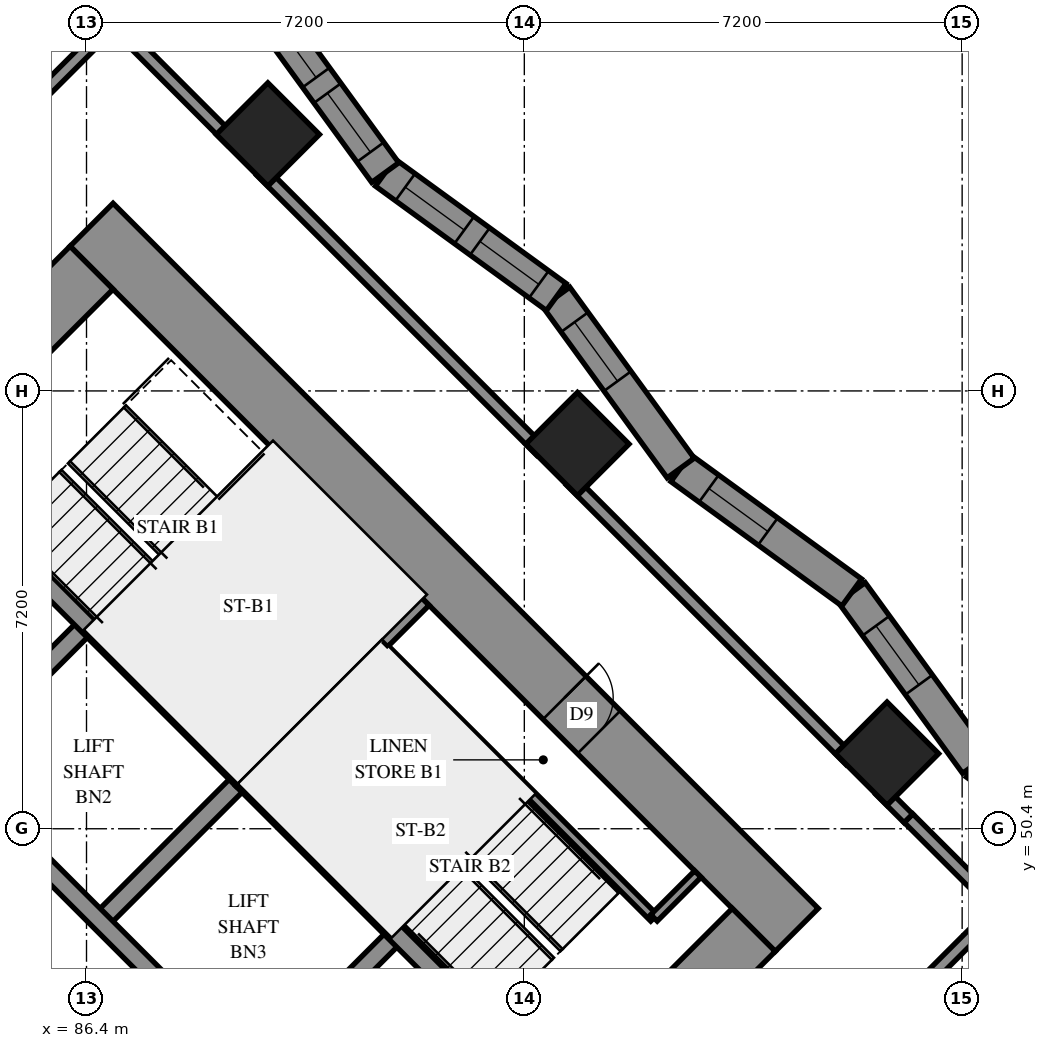
"""IFC4 building model, lengths in metres.
Left out: names, types, materials, properties, quantities, classifications, styles, units other than length and angle.
Written with IfcOpenShell. Run it as: python <this file> out.ifc"""

import sys

from ifc_helpers import new_model, si_unit, direction, frame, frame_2d, origin, origin_2d, place, context, subcontext, project, spatial, polyline, rectangle, outline, extrude, element, fill, save


model = new_model("IFC4")
c1 = context("Model", 3, precision=1e-05, world=origin(), true_north=direction((0.0, 1.0)))
c2 = subcontext(c1, "Body", "Model", "MODEL_VIEW")
j1 = project(units=[si_unit("LENGTHUNIT", "METRE"), si_unit("PLANEANGLEUNIT", "RADIAN")], contexts=[c1])
p1 = place(None, origin())
s1 = spatial("IfcSite", under=j1, at=p1, CompositionType="ELEMENT")
p2 = place(p1, origin())
s2 = spatial("IfcBuilding", under=s1, at=p2, CompositionType="ELEMENT")
p3 = place(p2, frame((0.0, 0.0, 54.2)))
s3 = spatial("IfcBuildingStorey", under=s2, at=p3, CompositionType="ELEMENT", Elevation=54.2)
for number, where, z_axis, x_axis in (
    (1, (89.382, 61.818, 0.0), (0.0, 0.0, 1.0), (0.707, -0.707, 0.0)),
    (2, (94.474, 56.727, 0.0), (0.0, 0.0, 1.0), (0.707, -0.707, 0.0)),
    (3, (99.565, 51.635, 0.0), (0.0, 0.0, 1.0), (0.707, -0.707, 0.0)),
):
    element("IfcColumn", number, at=place(p3, frame(where, z_axis=z_axis, x_axis=x_axis)), inside=s3, PredefinedType="COLUMN", context=c2, shape_type="SweptSolid", body=[
        extrude(rectangle(XDim=1.2, YDim=1.2, at=origin_2d()), origin(), (0.0, 0.0, 1.0), 3.1),
    ])
p4 = place(p3, frame((75.594, 49.443, -0.3), z_axis=(0.0, 0.0, 1.0), x_axis=(0.7071037324, -0.70710983, 0.0)))
e4 = element("IfcWall", 4, at=p4, inside=s3, PredefinedType="SHEAR", context=c2, shape_type="SweptSolid", body=[
    extrude(rectangle(XDim=16.4, YDim=1.0, at=frame_2d((8.2, 0.0))), origin(), (0.0, 0.0, 1.0), 2.7),
])
p5 = place(p3, frame((86.483, 60.333, -0.3), z_axis=(0.0, 0.0, 1.0), x_axis=(0.70710983, -0.7071037324, 0.0)))
e5 = element("IfcWall", 5, at=p5, inside=s3, PredefinedType="SHEAR", context=c2, shape_type="SweptSolid", body=[
    extrude(rectangle(XDim=16.4, YDim=1.0, at=frame_2d((8.2, 0.0))), origin(), (0.0, 0.0, 1.0), 2.7),
])
p6 = place(p5, frame((11.0, 0.0, 0.3)))
e6 = element("IfcOpeningElement", 6, at=p6, cuts=e5, PredefinedType="OPENING", context=c2, shape_type="SweptSolid", body=[
    extrude(rectangle(XDim=0.8, YDim=2.1, at=frame_2d((0.4, 1.05))), frame((0.0, 0.51, 0.0), z_axis=(0.0, -1.0, 0.0), x_axis=(1.0, 0.0, 0.0)), (0.0, 0.0, 1.0), 1.02),
])
p7 = place(p3, frame((76.301, 49.443, -0.3), z_axis=(0.0, 0.0, 1.0), x_axis=(0.7071067812, 0.7071067812, 0.0)))
e7 = element("IfcWall", 7, at=p7, inside=s3, PredefinedType="SHEAR", context=c2, shape_type="SweptSolid", body=[
    extrude(rectangle(XDim=14.4, YDim=1.0, at=frame_2d((7.2, 0.0))), origin(), (0.0, 0.0, 1.0), 2.7),
])
p8 = place(p7, frame((4.55, 0.0, 0.3)))
e8 = element("IfcOpeningElement", 8, at=p8, cuts=e7, PredefinedType="OPENING", context=c2, shape_type="SweptSolid", body=[
    extrude(rectangle(XDim=1.1, YDim=2.1, at=frame_2d((0.55, 1.05))), frame((0.0, 0.51, 0.0), z_axis=(0.0, -1.0, 0.0), x_axis=(1.0, 0.0, 0.0)), (0.0, 0.0, 1.0), 1.02),
])
p9 = place(p7, frame((11.35, 0.0, 0.3)))
e9 = element("IfcOpeningElement", 9, at=p9, cuts=e7, PredefinedType="OPENING", context=c2, shape_type="SweptSolid", body=[
    extrude(rectangle(XDim=1.1, YDim=2.1, at=frame_2d((0.55, 1.05))), frame((0.0, 0.51, 0.0), z_axis=(0.0, -1.0, 0.0), x_axis=(1.0, 0.0, 0.0)), (0.0, 0.0, 1.0), 1.02),
])
p10 = place(p3, frame((87.19, 38.554, -0.3), z_axis=(0.0, 0.0, 1.0), x_axis=(0.707103309, 0.7071102534, 0.0)))
e10 = element("IfcWall", 10, at=p10, inside=s3, PredefinedType="SHEAR", context=c2, shape_type="SweptSolid", body=[
    extrude(rectangle(XDim=14.4, YDim=1.0, at=frame_2d((7.2, 0.0))), origin(), (0.0, 0.0, 1.0), 2.7),
])
p11 = place(p10, frame((4.55, 0.0, 0.3)))
e11 = element("IfcOpeningElement", 11, at=p11, cuts=e10, PredefinedType="OPENING", context=c2, shape_type="SweptSolid", body=[
    extrude(rectangle(XDim=1.1, YDim=2.1, at=frame_2d((0.55, 1.05))), frame((0.0, 0.51, 0.0), z_axis=(0.0, -1.0, 0.0), x_axis=(1.0, 0.0, 0.0)), (0.0, 0.0, 1.0), 1.02),
])
p12 = place(p10, frame((11.35, 0.0, 0.3)))
e12 = element("IfcOpeningElement", 12, at=p12, cuts=e10, PredefinedType="OPENING", context=c2, shape_type="SweptSolid", body=[
    extrude(rectangle(XDim=1.1, YDim=2.1, at=frame_2d((0.55, 1.05))), frame((0.0, 0.51, 0.0), z_axis=(0.0, -1.0, 0.0), x_axis=(1.0, 0.0, 0.0)), (0.0, 0.0, 1.0), 1.02),
])
p13 = place(p3, frame((84.079, 51.423, 0.0), z_axis=(0.0, 0.0, 1.0), x_axis=(0.7071219326, 0.7070916295, 0.0)))
e13 = element("IfcWall", 13, at=p13, inside=s3, PredefinedType="SOLIDWALL", context=c2, shape_type="SweptSolid", body=[
    extrude(rectangle(XDim=3.3, YDim=0.3, at=frame_2d((1.65, 0.0))), origin(), (0.0, 0.0, 1.0), 3.1),
])
for number, where, z_axis, x_axis in (
    (14, (86.625, 48.878, 0.0), (0.0, 0.0, 1.0), (0.707, 0.707, 0.0)),
    (15, (89.17, 46.332, 0.0), (0.0, 0.0, 1.0), (0.707, 0.707, 0.0)),
):
    element("IfcWall", number, at=place(p3, frame(where, z_axis=z_axis, x_axis=x_axis)), inside=s3, PredefinedType="SOLIDWALL", context=c2, shape_type="SweptSolid", body=[
        extrude(rectangle(XDim=3.3, YDim=0.3, at=frame_2d((1.65, 0.0))), origin(), (0.0, 0.0, 1.0), 3.1),
    ])
p14 = place(p3, frame((78.988, 51.423, 0.0), z_axis=(0.0, 0.0, 1.0), x_axis=(0.7071067812, -0.7071067812, 0.0)))
e16 = element("IfcWall", 16, at=p14, inside=s3, PredefinedType="SOLIDWALL", context=c2, shape_type="SweptSolid", body=[
    extrude(rectangle(XDim=14.4, YDim=0.3, at=frame_2d((7.2, 0.0))), origin(), (0.0, 0.0, 1.0), 3.1),
])
p15 = place(p14, frame((1.25, 0.0, 0.0)))
e17 = element("IfcOpeningElement", 17, at=p15, cuts=e16, PredefinedType="OPENING", context=c2, shape_type="SweptSolid", body=[
    extrude(rectangle(XDim=1.1, YDim=2.1, at=frame_2d((0.55, 1.05))), frame((0.0, 0.16, 0.0), z_axis=(0.0, -1.0, 0.0), x_axis=(1.0, 0.0, 0.0)), (0.0, 0.0, 1.0), 0.32),
])
p16 = place(p14, frame((4.85, 0.0, 0.0)))
e18 = element("IfcOpeningElement", 18, at=p16, cuts=e16, PredefinedType="OPENING", context=c2, shape_type="SweptSolid", body=[
    extrude(rectangle(XDim=1.1, YDim=2.1, at=frame_2d((0.55, 1.05))), frame((0.0, 0.16, 0.0), z_axis=(0.0, -1.0, 0.0), x_axis=(1.0, 0.0, 0.0)), (0.0, 0.0, 1.0), 0.32),
])
p17 = place(p14, frame((8.45, 0.0, 0.0)))
e19 = element("IfcOpeningElement", 19, at=p17, cuts=e16, PredefinedType="OPENING", context=c2, shape_type="SweptSolid", body=[
    extrude(rectangle(XDim=1.1, YDim=2.1, at=frame_2d((0.55, 1.05))), frame((0.0, 0.16, 0.0), z_axis=(0.0, -1.0, 0.0), x_axis=(1.0, 0.0, 0.0)), (0.0, 0.0, 1.0), 0.32),
])
p18 = place(p14, frame((12.05, 0.0, 0.0)))
e20 = element("IfcOpeningElement", 20, at=p18, cuts=e16, PredefinedType="OPENING", context=c2, shape_type="SweptSolid", body=[
    extrude(rectangle(XDim=1.1, YDim=2.1, at=frame_2d((0.55, 1.05))), frame((0.0, 0.16, 0.0), z_axis=(0.0, -1.0, 0.0), x_axis=(1.0, 0.0, 0.0)), (0.0, 0.0, 1.0), 0.32),
])
p19 = place(p3, frame((81.534, 53.969, 0.0), z_axis=(0.0, 0.0, 1.0), x_axis=(0.707103309, -0.7071102534, 0.0)))
e21 = element("IfcWall", 21, at=p19, inside=s3, PredefinedType="SOLIDWALL", context=c2, shape_type="SweptSolid", body=[
    extrude(rectangle(XDim=14.4, YDim=0.3, at=frame_2d((7.2, 0.0))), origin(), (0.0, 0.0, 1.0), 3.1),
])
p20 = place(p19, frame((12.05, 0.0, 0.0)))
e22 = element("IfcOpeningElement", 22, at=p20, cuts=e21, PredefinedType="OPENING", context=c2, shape_type="SweptSolid", body=[
    extrude(rectangle(XDim=1.1, YDim=2.1, at=frame_2d((0.55, 1.05))), frame((0.0, 0.16, 0.0), z_axis=(0.0, -1.0, 0.0), x_axis=(1.0, 0.0, 0.0)), (0.0, 0.0, 1.0), 0.32),
])
for number, where, z_axis, x_axis in (
    (23, (83.867, 56.302, 0.0), (0.0, 0.0, 1.0), (0.707, -0.707, 0.0)),
    (24, (88.958, 51.211, 0.0), (0.0, 0.0, 1.0), (0.707, -0.707, 0.0)),
):
    element("IfcWall", number, at=place(p3, frame(where, z_axis=z_axis, x_axis=x_axis)), inside=s3, PredefinedType="SOLIDWALL", context=c2, shape_type="SweptSolid", body=[
        extrude(rectangle(XDim=7.2, YDim=0.3, at=frame_2d((3.6, 0.0))), origin(), (0.0, 0.0, 1.0), 3.1),
    ])
p21 = place(p3, frame((88.958, 51.211, 0.0), z_axis=(0.0, 0.0, 1.0), x_axis=(0.7071067812, 0.7071067812, 0.0)))
e25 = element("IfcWall", 25, at=p21, inside=s3, PredefinedType="SOLIDWALL", context=c2, shape_type="SweptSolid", body=[
    extrude(rectangle(XDim=4.2, YDim=0.3, at=frame_2d((2.1, 0.0))), origin(), (0.0, 0.0, 1.0), 3.1),
])
p22 = place(p3, frame((103.843, 49.427, 0.0), z_axis=(0.0, 0.0, 1.0), x_axis=(-0.8086676991, 0.5882657159, 0.0)))
e26 = element("IfcWall", 26, at=p22, inside=s3, PredefinedType="SOLIDWALL", context=c2, shape_type="SweptSolid", body=[
    extrude(outline(polyline([(-0.043, -0.275), (3.435, -0.275), (3.522, 0.275), (0.043, 0.275), (-0.043, -0.275)])), origin(), (0.0, 0.0, 1.0), 3.1),
])
p23 = place(p22, frame((1.538, 0.0, 0.5)))
e27 = element("IfcOpeningElement", 27, at=p23, cuts=e26, PredefinedType="OPENING", context=c2, shape_type="SweptSolid", body=[
    extrude(rectangle(XDim=1.2, YDim=2.45, at=frame_2d((0.6, 1.225))), frame((0.0, 0.285, 0.0), z_axis=(0.0, -1.0, 0.0), x_axis=(1.0, 0.0, 0.0)), (0.0, 0.0, 1.0), 0.57),
])
p24 = place(p3, frame((101.03, 51.473, 0.0), z_axis=(0.0, 0.0, 1.0), x_axis=(-0.5882793931, 0.8086577494, 0.0)))
e28 = element("IfcWall", 28, at=p24, inside=s3, PredefinedType="SOLIDWALL", context=c2, shape_type="SweptSolid", body=[
    extrude(outline(polyline([(0.043, -0.275), (3.522, -0.275), (3.435, 0.275), (-0.043, 0.275), (0.043, -0.275)])), origin(), (0.0, 0.0, 1.0), 3.1),
])
p25 = place(p24, frame((1.6, 0.0, 0.5)))
e29 = element("IfcOpeningElement", 29, at=p25, cuts=e28, PredefinedType="OPENING", context=c2, shape_type="SweptSolid", body=[
    extrude(rectangle(XDim=1.2, YDim=2.45, at=frame_2d((0.6, 1.225))), frame((0.0, 0.285, 0.0), z_axis=(0.0, -1.0, 0.0), x_axis=(1.0, 0.0, 0.0)), (0.0, 0.0, 1.0), 0.57),
])
p26 = place(p3, frame((98.984, 54.286, 0.0), z_axis=(0.0, 0.0, 1.0), x_axis=(-0.8086577494, 0.5882793931, 0.0)))
e30 = element("IfcWall", 30, at=p26, inside=s3, PredefinedType="SOLIDWALL", context=c2, shape_type="SweptSolid", body=[
    extrude(outline(polyline([(-0.043, -0.275), (3.435, -0.275), (3.522, 0.275), (0.043, 0.275), (-0.043, -0.275)])), origin(), (0.0, 0.0, 1.0), 3.1),
])
p27 = place(p26, frame((1.705, 0.0, 0.5)))
e31 = element("IfcOpeningElement", 31, at=p27, cuts=e30, PredefinedType="OPENING", context=c2, shape_type="SweptSolid", body=[
    extrude(rectangle(XDim=1.2, YDim=2.45, at=frame_2d((0.6, 1.225))), frame((0.0, 0.285, 0.0), z_axis=(0.0, -1.0, 0.0), x_axis=(1.0, 0.0, 0.0)), (0.0, 0.0, 1.0), 0.57),
])
p28 = place(p3, frame((96.171, 56.332, 0.0), z_axis=(0.0, 0.0, 1.0), x_axis=(-0.5882793931, 0.8086577494, 0.0)))
e32 = element("IfcWall", 32, at=p28, inside=s3, PredefinedType="SOLIDWALL", context=c2, shape_type="SweptSolid", body=[
    extrude(outline(polyline([(0.043, -0.275), (3.522, -0.275), (3.435, 0.275), (-0.043, 0.275), (0.043, -0.275)])), origin(), (0.0, 0.0, 1.0), 3.1),
])
p29 = place(p28, frame((1.766, 0.0, 0.5)))
e33 = element("IfcOpeningElement", 33, at=p29, cuts=e32, PredefinedType="OPENING", context=c2, shape_type="SweptSolid", body=[
    extrude(rectangle(XDim=1.2, YDim=2.45, at=frame_2d((0.6, 1.225))), frame((0.0, 0.285, 0.0), z_axis=(0.0, -1.0, 0.0), x_axis=(1.0, 0.0, 0.0)), (0.0, 0.0, 1.0), 0.57),
])
p30 = place(p3, frame((94.125, 59.145, 0.0), z_axis=(0.0, 0.0, 1.0), x_axis=(-0.808644072, 0.5882981939, 0.0)))
e34 = element("IfcWall", 34, at=p30, inside=s3, PredefinedType="SOLIDWALL", context=c2, shape_type="SweptSolid", body=[
    extrude(outline(polyline([(-0.043, -0.275), (3.435, -0.275), (3.522, 0.275), (0.043, 0.275), (-0.043, -0.275)])), origin(), (0.0, 0.0, 1.0), 3.1),
])
p31 = place(p30, frame((0.354, 0.0, 0.5)))
e35 = element("IfcOpeningElement", 35, at=p31, cuts=e34, PredefinedType="OPENING", context=c2, shape_type="SweptSolid", body=[
    extrude(rectangle(XDim=1.2, YDim=2.45, at=frame_2d((0.6, 1.225))), frame((0.0, 0.285, 0.0), z_axis=(0.0, -1.0, 0.0), x_axis=(1.0, 0.0, 0.0)), (0.0, 0.0, 1.0), 0.57),
])
p32 = place(p30, frame((1.871, 0.0, 0.5)))
e36 = element("IfcOpeningElement", 36, at=p32, cuts=e34, PredefinedType="OPENING", context=c2, shape_type="SweptSolid", body=[
    extrude(rectangle(XDim=1.2, YDim=2.45, at=frame_2d((0.6, 1.225))), frame((0.0, 0.285, 0.0), z_axis=(0.0, -1.0, 0.0), x_axis=(1.0, 0.0, 0.0)), (0.0, 0.0, 1.0), 0.57),
])
p33 = place(p3, frame((91.312, 61.191, 0.0), z_axis=(0.0, 0.0, 1.0), x_axis=(-0.5882793931, 0.8086577494, 0.0)))
e37 = element("IfcWall", 37, at=p33, inside=s3, PredefinedType="SOLIDWALL", context=c2, shape_type="SweptSolid", body=[
    extrude(outline(polyline([(0.043, -0.275), (3.522, -0.275), (3.435, 0.275), (-0.043, 0.275), (0.043, -0.275)])), origin(), (0.0, 0.0, 1.0), 3.1),
])
p34 = place(p33, frame((0.415, 0.0, 0.5)))
e38 = element("IfcOpeningElement", 38, at=p34, cuts=e37, PredefinedType="OPENING", context=c2, shape_type="SweptSolid", body=[
    extrude(rectangle(XDim=1.2, YDim=2.45, at=frame_2d((0.6, 1.225))), frame((0.0, 0.285, 0.0), z_axis=(0.0, -1.0, 0.0), x_axis=(1.0, 0.0, 0.0)), (0.0, 0.0, 1.0), 0.57),
])
p35 = place(p33, frame((1.933, 0.0, 0.5)))
e39 = element("IfcOpeningElement", 39, at=p35, cuts=e37, PredefinedType="OPENING", context=c2, shape_type="SweptSolid", body=[
    extrude(rectangle(XDim=1.2, YDim=2.45, at=frame_2d((0.6, 1.225))), frame((0.0, 0.285, 0.0), z_axis=(0.0, -1.0, 0.0), x_axis=(1.0, 0.0, 0.0)), (0.0, 0.0, 1.0), 0.57),
])
p36 = place(p3, frame((91.313, 53.354, 0.0), z_axis=(0.0, 0.0, 1.0), x_axis=(0.7071147811, -0.7070987812, 0.0)))
e40 = element("IfcWall", 40, at=p36, inside=s3, PredefinedType="PARTITIONING", context=c2, shape_type="SweptSolid", body=[
    extrude(rectangle(XDim=6.25, YDim=0.15, at=frame_2d((3.125, 0.0))), origin(), (0.0, 0.0, 1.0), 3.1),
])
p37 = place(p3, frame((95.732, 48.934, 0.0), z_axis=(0.0, 0.0, 1.0), x_axis=(0.7071067812, 0.7071067812, 0.0)))
e41 = element("IfcWall", 41, at=p37, inside=s3, PredefinedType="PARTITIONING", context=c2, shape_type="SweptSolid", body=[
    extrude(rectangle(XDim=1.02, YDim=0.15, at=frame_2d((0.51, 0.0))), origin(), (0.0, 0.0, 1.0), 3.1),
])
p38 = place(p3, frame((95.109, 42.091, 0.0), z_axis=(0.0, 0.0, 1.0), x_axis=(0.7071113562, 0.7071022062, 0.0)))
e42 = element("IfcWall", 42, at=p38, inside=s3, PredefinedType="PARTITIONING", context=c2, shape_type="SweptSolid", body=[
    extrude(rectangle(XDim=10.929, YDim=0.2, at=frame_2d((5.465, 0.0))), origin(), (0.0, 0.0, 1.0), 3.1),
])
p39 = place(p3, frame((94.757, 42.445, 0.0), z_axis=(0.0, 0.0, 1.0), x_axis=(0.7071067812, 0.7071067812, 0.0)))
e43 = element("IfcWall", 43, at=p39, inside=s3, PredefinedType="PARTITIONING", context=c2, shape_type="SweptSolid", body=[
    extrude(rectangle(XDim=9.399, YDim=0.2, at=frame_2d((4.699, 0.0))), origin(), (0.0, 0.0, 1.0), 3.1),
])
p40 = place(p3, frame((81.052, 57.873, 0.0), z_axis=(0.0, 0.0, 1.0), x_axis=(0.7071067812, 0.7071067812, 0.0)))
e44 = element("IfcWall", 44, at=p40, inside=s3, PredefinedType="PARTITIONING", context=c2, shape_type="SweptSolid", body=[
    extrude(rectangle(XDim=8.18, YDim=0.2, at=frame_2d((4.09, 0.0))), origin(), (0.0, 0.0, 1.0), 3.1),
])
p41 = place(p40, frame((0.823, 0.0, 0.0)))
e45 = element("IfcOpeningElement", 45, at=p41, cuts=e44, PredefinedType="OPENING", context=c2, shape_type="SweptSolid", body=[
    extrude(rectangle(XDim=1.0, YDim=2.1, at=frame_2d((0.5, 1.05))), frame((0.0, 0.11, 0.0), z_axis=(0.0, -1.0, 0.0), x_axis=(1.0, 0.0, 0.0)), (0.0, 0.0, 1.0), 0.22),
])
p42 = place(p3, frame((89.271, 61.215, 0.0), z_axis=(0.0, 0.0, 1.0), x_axis=(0.7071067812, -0.7071067812, 0.0)))
e46 = element("IfcWall", 46, at=p42, inside=s3, PredefinedType="PARTITIONING", context=c2, shape_type="SweptSolid", body=[
    extrude(rectangle(XDim=6.505, YDim=0.2, at=frame_2d((3.253, 0.0))), origin(), (0.0, 0.0, 1.0), 3.1),
])
p43 = place(p3, frame((94.363, 56.123, 0.0), z_axis=(0.0, 0.0, 1.0), x_axis=(0.7071067812, -0.7071067812, 0.0)))
e47 = element("IfcWall", 47, at=p43, inside=s3, PredefinedType="PARTITIONING", context=c2, shape_type="SweptSolid", body=[
    extrude(rectangle(XDim=6.503, YDim=0.2, at=frame_2d((3.251, 0.0))), origin(), (0.0, 0.0, 1.0), 3.1),
])
p44 = place(p3, frame((86.841, 63.659, 0.0), z_axis=(0.0, 0.0, 1.0), x_axis=(0.7067795096, -0.7074339014, 0.0)))
e48 = element("IfcWall", 48, at=p44, inside=s3, PredefinedType="PARTITIONING", context=c2, shape_type="SweptSolid", body=[
    extrude(rectangle(XDim=2.751, YDim=0.2, at=frame_2d((1.375, 0.0))), origin(), (0.0, 0.0, 1.0), 3.1),
])
p45 = place(p3, frame((99.918, 50.574, 0.0), z_axis=(0.0, 0.0, 1.0), x_axis=(0.7075827869, -0.7066304548, 0.0)))
e49 = element("IfcWall", 49, at=p45, inside=s3, PredefinedType="PARTITIONING", context=c2, shape_type="SweptSolid", body=[
    extrude(rectangle(XDim=2.1, YDim=0.2, at=frame_2d((1.05, 0.0))), origin(), (0.0, 0.0, 1.0), 3.1),
])
p46 = place(p3, frame((99.453, 51.033, 0.0), z_axis=(0.0, 0.0, 1.0), x_axis=(0.7071067812, -0.7071067812, 0.0)))
e50 = element("IfcWall", 50, at=p46, inside=s3, PredefinedType="PARTITIONING", context=c2, shape_type="SweptSolid", body=[
    extrude(rectangle(XDim=0.653, YDim=0.2, at=frame_2d((0.327, 0.0))), origin(), (0.0, 0.0, 1.0), 3.1),
])
p47 = place(p25, origin())
e51 = element("IfcWindow", 51, at=p47, inside=s3, PartitioningType="SINGLE_PANEL", PredefinedType="WINDOW", context=c2, shape_type="SweptSolid", body=[
    extrude(rectangle(XDim=1.2, YDim=2.45, at=frame_2d((0.6, 1.225))), frame((0.0, 0.155, 0.0), z_axis=(0.0, -1.0, 0.0), x_axis=(1.0, 0.0, 0.0)), (0.0, 0.0, 1.0), 0.06),
])
fill(e29, e51)
p48 = place(p27, origin())
e52 = element("IfcWindow", 52, at=p48, inside=s3, PartitioningType="SINGLE_PANEL", PredefinedType="WINDOW", context=c2, shape_type="SweptSolid", body=[
    extrude(rectangle(XDim=1.2, YDim=2.45, at=frame_2d((0.6, 1.225))), frame((0.0, 0.155, 0.0), z_axis=(0.0, -1.0, 0.0), x_axis=(1.0, 0.0, 0.0)), (0.0, 0.0, 1.0), 0.06),
])
fill(e31, e52)
p49 = place(p29, origin())
e53 = element("IfcWindow", 53, at=p49, inside=s3, PartitioningType="SINGLE_PANEL", PredefinedType="WINDOW", context=c2, shape_type="SweptSolid", body=[
    extrude(rectangle(XDim=1.2, YDim=2.45, at=frame_2d((0.6, 1.225))), frame((0.0, 0.155, 0.0), z_axis=(0.0, -1.0, 0.0), x_axis=(1.0, 0.0, 0.0)), (0.0, 0.0, 1.0), 0.06),
])
fill(e33, e53)
p50 = place(p31, origin())
e54 = element("IfcWindow", 54, at=p50, inside=s3, PartitioningType="SINGLE_PANEL", PredefinedType="WINDOW", context=c2, shape_type="SweptSolid", body=[
    extrude(rectangle(XDim=1.2, YDim=2.45, at=frame_2d((0.6, 1.225))), frame((0.0, 0.155, 0.0), z_axis=(0.0, -1.0, 0.0), x_axis=(1.0, 0.0, 0.0)), (0.0, 0.0, 1.0), 0.06),
])
fill(e35, e54)
p51 = place(p32, origin())
e55 = element("IfcWindow", 55, at=p51, inside=s3, PartitioningType="SINGLE_PANEL", PredefinedType="WINDOW", context=c2, shape_type="SweptSolid", body=[
    extrude(rectangle(XDim=1.2, YDim=2.45, at=frame_2d((0.6, 1.225))), frame((0.0, 0.155, 0.0), z_axis=(0.0, -1.0, 0.0), x_axis=(1.0, 0.0, 0.0)), (0.0, 0.0, 1.0), 0.06),
])
fill(e36, e55)
p52 = place(p34, origin())
e56 = element("IfcWindow", 56, at=p52, inside=s3, PartitioningType="SINGLE_PANEL", PredefinedType="WINDOW", context=c2, shape_type="SweptSolid", body=[
    extrude(rectangle(XDim=1.2, YDim=2.45, at=frame_2d((0.6, 1.225))), frame((0.0, 0.155, 0.0), z_axis=(0.0, -1.0, 0.0), x_axis=(1.0, 0.0, 0.0)), (0.0, 0.0, 1.0), 0.06),
])
fill(e38, e56)
p53 = place(p35, origin())
e57 = element("IfcWindow", 57, at=p53, inside=s3, PartitioningType="SINGLE_PANEL", PredefinedType="WINDOW", context=c2, shape_type="SweptSolid", body=[
    extrude(rectangle(XDim=1.2, YDim=2.45, at=frame_2d((0.6, 1.225))), frame((0.0, 0.155, 0.0), z_axis=(0.0, -1.0, 0.0), x_axis=(1.0, 0.0, 0.0)), (0.0, 0.0, 1.0), 0.06),
])
fill(e39, e57)
p54 = place(p6, origin())
e58 = element("IfcDoor", 58, at=p54, inside=s3, OperationType="SINGLE_SWING_RIGHT", PredefinedType="DOOR", context=c2, shape_type="SweptSolid", body=[
    extrude(rectangle(XDim=0.8, YDim=2.1, at=frame_2d((0.4, 1.05))), frame((0.0, -0.44, 0.0), z_axis=(0.0, -1.0, 0.0), x_axis=(1.0, 0.0, 0.0)), (0.0, 0.0, 1.0), 0.05),
])
fill(e6, e58)
save(model, sys.argv[1])
